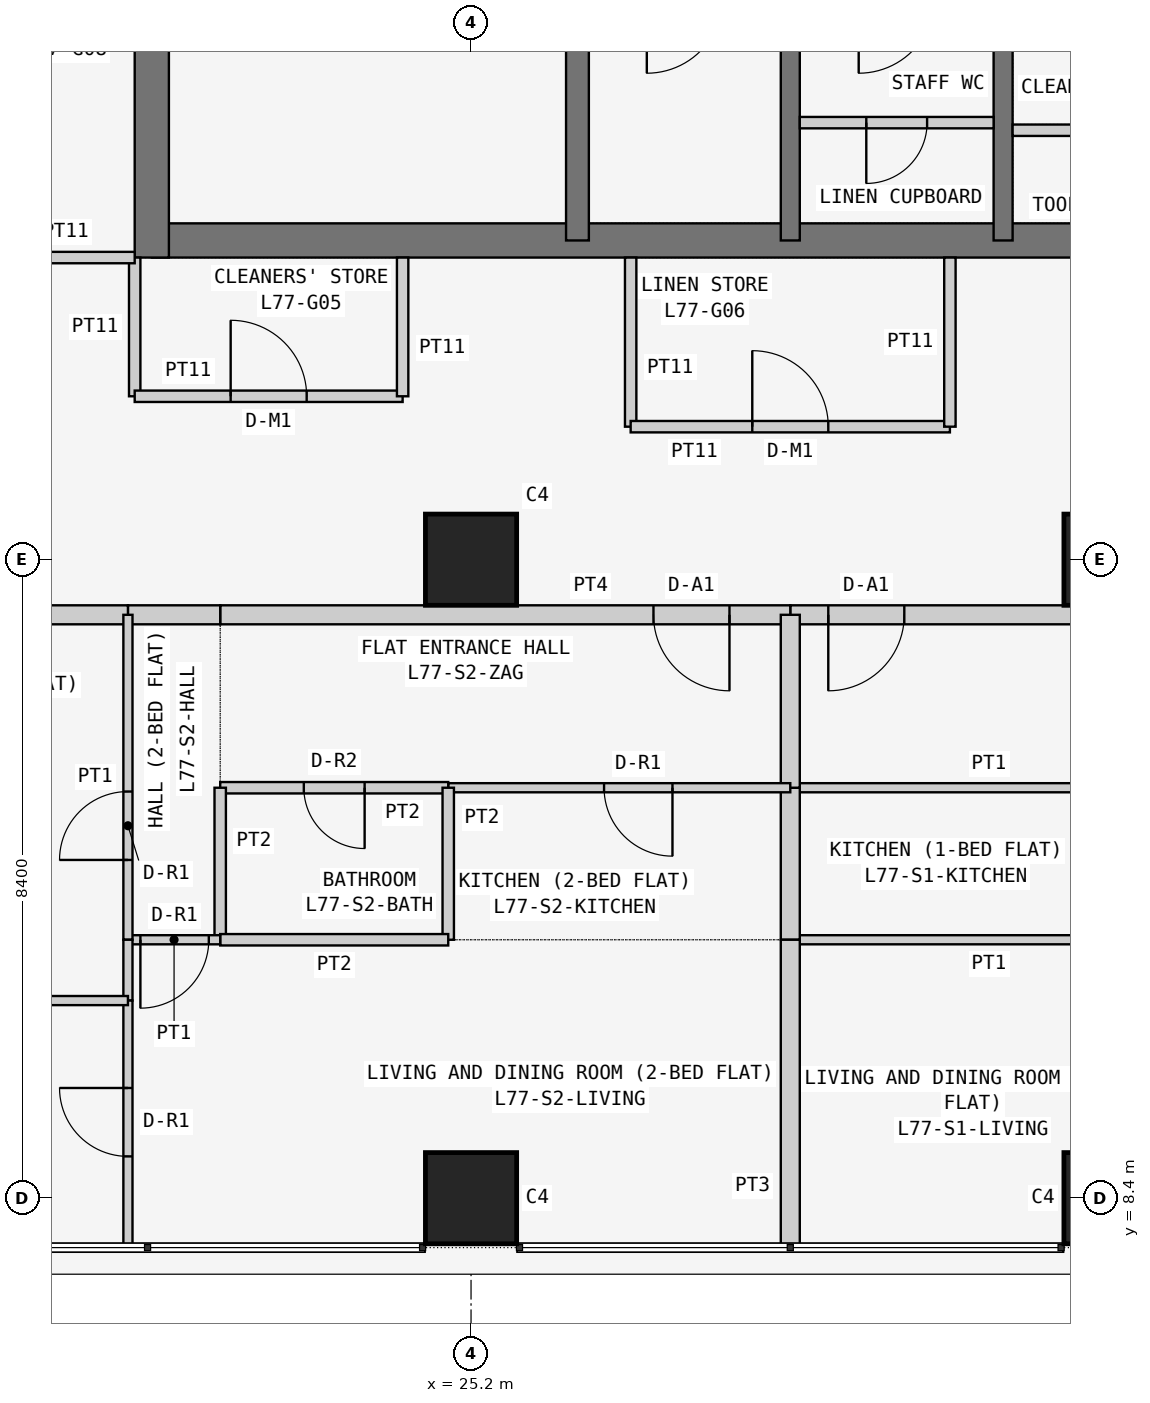
"""IFC4 building model, lengths in metres.
Left out: names, types, materials, properties, quantities, classifications, styles, units other than length and angle.
Written with IfcOpenShell. Run it as: python <this file> out.ifc"""

import sys

from ifc_helpers import new_model, si_unit, direction, frame, frame_2d, origin, origin_2d, place, context, subcontext, project, spatial, rectangle, extrude, element, fill, save


model = new_model("IFC4")
c1 = context("Model", 3, precision=1e-05, world=origin(), true_north=direction((0.0, 1.0)))
c2 = subcontext(c1, "Body", "Model", "MODEL_VIEW")
j1 = project(units=[si_unit("LENGTHUNIT", "METRE"), si_unit("PLANEANGLEUNIT", "RADIAN")], contexts=[c1])
p1 = place(None, origin())
s1 = spatial("IfcSite", under=j1, at=p1, CompositionType="ELEMENT")
p2 = place(p1, origin())
s2 = spatial("IfcBuilding", under=s1, at=p2, CompositionType="ELEMENT")
p3 = place(p2, frame((0.0, 0.0, 293.7)))
s3 = spatial("IfcBuildingStorey", under=s2, at=p3, CompositionType="ELEMENT", Elevation=293.7)
for number, where, z_axis, x_axis in (
    (1, (25.2, 8.4, 0.0), (0.0, 0.0, 1.0), (1.0, 0.0, 0.0)),
    (2, (25.2, 16.8, 0.0), (0.0, 0.0, 1.0), (1.0, 0.0, 0.0)),
    (3, (33.6, 8.4, 0.0), (0.0, 0.0, 1.0), (1.0, 0.0, 0.0)),
    (4, (33.6, 16.8, 0.0), (0.0, 0.0, 1.0), (1.0, 0.0, 0.0)),
):
    element("IfcColumn", number, at=place(p3, frame(where, z_axis=z_axis, x_axis=x_axis)), inside=s3, PredefinedType="COLUMN", context=c2, shape_type="SweptSolid", body=[
        extrude(rectangle(XDim=1.2, YDim=1.2, at=origin_2d()), origin(), (0.0, 0.0, 1.0), 3.6),
    ])
p4 = place(p3, frame((21.0, 21.0, 0.0), z_axis=(0.0, 0.0, 1.0), x_axis=(1.0, 0.0, 0.0)))
e5 = element("IfcWall", 5, at=p4, inside=s3, PredefinedType="SHEAR", context=c2, shape_type="SweptSolid", body=[
    extrude(rectangle(XDim=17.025, YDim=0.45, at=frame_2d((8.512, 0.0))), origin(), (0.0, 0.0, 1.0), 3.6),
])
p5 = place(p3, frame((21.0, 37.8, 0.0), z_axis=(0.0, 0.0, 1.0), x_axis=(0.0, -1.0, 0.0)))
e6 = element("IfcWall", 6, at=p5, inside=s3, PredefinedType="SHEAR", context=c2, shape_type="SweptSolid", body=[
    extrude(rectangle(XDim=17.025, YDim=0.45, at=frame_2d((8.513, 0.0))), origin(), (0.0, 0.0, 1.0), 3.6),
])
p6 = place(p5, frame((5.4, 0.0, 0.0)))
e7 = element("IfcOpeningElement", 7, at=p6, cuts=e6, PredefinedType="OPENING", context=c2, shape_type="SweptSolid", body=[
    extrude(rectangle(XDim=1.2, YDim=2.1, at=frame_2d((0.6, 1.05))), frame((0.0, 0.235, 0.0), z_axis=(0.0, -1.0, 0.0), x_axis=(1.0, 0.0, 0.0)), (0.0, 0.0, 1.0), 0.47),
])
p7 = place(p3, frame((26.6, 21.0, 0.0), z_axis=(0.0, 0.0, 1.0), x_axis=(0.0, 1.0, 0.0)))
e8 = element("IfcWall", 8, at=p7, inside=s3, PredefinedType="SHEAR", context=c2, shape_type="SweptSolid", body=[
    extrude(rectangle(XDim=16.8, YDim=0.3, at=frame_2d((8.4, 0.0))), origin(), (0.0, 0.0, 1.0), 3.6),
])
p8 = place(p7, frame((10.4, 0.0, 0.0)))
e9 = element("IfcOpeningElement", 9, at=p8, cuts=e8, PredefinedType="OPENING", context=c2, shape_type="SweptSolid", body=[
    extrude(rectangle(XDim=1.2, YDim=2.1, at=frame_2d((0.6, 1.05))), frame((0.0, 0.16, 0.0), z_axis=(0.0, -1.0, 0.0), x_axis=(1.0, 0.0, 0.0)), (0.0, 0.0, 1.0), 0.32),
])
for number, where, z_axis, x_axis in (
    (10, (29.4, 21.0, 0.0), (0.0, 0.0, 1.0), (0.0, 1.0, 0.0)),
    (11, (32.2, 21.0, 0.0), (0.0, 0.0, 1.0), (0.0, 1.0, 0.0)),
):
    element("IfcWall", number, at=place(p3, frame(where, z_axis=z_axis, x_axis=x_axis)), inside=s3, PredefinedType="SHEAR", context=c2, shape_type="SweptSolid", body=[
        extrude(rectangle(XDim=3.2, YDim=0.25, at=frame_2d((1.6, 0.0))), origin(), (0.0, 0.0, 1.0), 3.6),
    ])
p9 = place(p3, frame((20.775, 20.775, 0.0), z_axis=(0.0, 0.0, 1.0), x_axis=(0.0, -1.0, 0.0)))
e12 = element("IfcWall", 12, at=p9, inside=s3, PredefinedType="PARTITIONING", context=c2, shape_type="SweptSolid", body=[
    extrude(rectangle(XDim=1.825, YDim=0.15, at=frame_2d((0.913, 0.0))), origin(), (0.0, 0.0, 1.0), 3.45),
])
p10 = place(p3, frame((20.775, 18.95, 0.0), z_axis=(0.0, 0.0, 1.0), x_axis=(1.0, 0.0, 0.0)))
e13 = element("IfcWall", 13, at=p10, inside=s3, PredefinedType="PARTITIONING", context=c2, shape_type="SweptSolid", body=[
    extrude(rectangle(XDim=3.525, YDim=0.15, at=frame_2d((1.763, 0.0))), origin(), (0.0, 0.0, 1.0), 3.45),
])
p11 = place(p10, frame((1.262, 0.0, 0.0)))
e14 = element("IfcOpeningElement", 14, at=p11, cuts=e13, PredefinedType="OPENING", context=c2, shape_type="SweptSolid", body=[
    extrude(rectangle(XDim=1.0, YDim=2.1, at=frame_2d((0.5, 1.05))), frame((0.0, 0.085, 0.0), z_axis=(0.0, -1.0, 0.0), x_axis=(1.0, 0.0, 0.0)), (0.0, 0.0, 1.0), 0.17),
])
p12 = place(p3, frame((24.3, 18.95, 0.0), z_axis=(0.0, 0.0, 1.0), x_axis=(0.0, 1.0, 0.0)))
e15 = element("IfcWall", 15, at=p12, inside=s3, PredefinedType="PARTITIONING", context=c2, shape_type="SweptSolid", body=[
    extrude(rectangle(XDim=1.825, YDim=0.15, at=frame_2d((0.913, 0.0))), origin(), (0.0, 0.0, 1.0), 3.45),
])
p13 = place(p3, frame((27.3, 20.775, 0.0), z_axis=(0.0, 0.0, 1.0), x_axis=(0.0, -1.0, 0.0)))
e16 = element("IfcWall", 16, at=p13, inside=s3, PredefinedType="PARTITIONING", context=c2, shape_type="SweptSolid", body=[
    extrude(rectangle(XDim=2.225, YDim=0.15, at=frame_2d((1.112, 0.0))), origin(), (0.0, 0.0, 1.0), 3.45),
])
p14 = place(p3, frame((27.3, 18.55, 0.0), z_axis=(0.0, 0.0, 1.0), x_axis=(1.0, 0.0, 0.0)))
e17 = element("IfcWall", 17, at=p14, inside=s3, PredefinedType="PARTITIONING", context=c2, shape_type="SweptSolid", body=[
    extrude(rectangle(XDim=4.2, YDim=0.15, at=frame_2d((2.1, 0.0))), origin(), (0.0, 0.0, 1.0), 3.45),
])
p15 = place(p14, frame((1.6, 0.0, 0.0)))
e18 = element("IfcOpeningElement", 18, at=p15, cuts=e17, PredefinedType="OPENING", context=c2, shape_type="SweptSolid", body=[
    extrude(rectangle(XDim=1.0, YDim=2.1, at=frame_2d((0.5, 1.05))), frame((0.0, 0.085, 0.0), z_axis=(0.0, -1.0, 0.0), x_axis=(1.0, 0.0, 0.0)), (0.0, 0.0, 1.0), 0.17),
])
p16 = place(p3, frame((31.5, 18.55, 0.0), z_axis=(0.0, 0.0, 1.0), x_axis=(0.0, 1.0, 0.0)))
e19 = element("IfcWall", 19, at=p16, inside=s3, PredefinedType="PARTITIONING", context=c2, shape_type="SweptSolid", body=[
    extrude(rectangle(XDim=2.225, YDim=0.15, at=frame_2d((1.112, 0.0))), origin(), (0.0, 0.0, 1.0), 3.45),
])
p17 = place(p3, frame((18.95, 20.775, 0.0), z_axis=(0.0, 0.0, 1.0), x_axis=(1.0, 0.0, 0.0)))
e20 = element("IfcWall", 20, at=p17, inside=s3, PredefinedType="PARTITIONING", context=c2, shape_type="SweptSolid", body=[
    extrude(rectangle(XDim=1.825, YDim=0.15, at=frame_2d((0.913, 0.0))), origin(), (0.0, 0.0, 1.0), 3.45),
])
p18 = place(p3, frame((35.829, 16.075, 0.0), z_axis=(0.0, 0.0, 1.0), x_axis=(-1.0, 0.0, 0.0)))
e21 = element("IfcWall", 21, at=p18, inside=s3, PredefinedType="PARTITIONING", context=c2, shape_type="SweptSolid", body=[
    extrude(rectangle(XDim=6.429, YDim=0.25, at=frame_2d((3.215, 0.0))), origin(), (0.0, 0.0, 1.0), 3.45),
])
p19 = place(p18, frame((4.929, 0.0, 0.0)))
e22 = element("IfcOpeningElement", 22, at=p19, cuts=e21, PredefinedType="OPENING", context=c2, shape_type="SweptSolid", body=[
    extrude(rectangle(XDim=1.0, YDim=2.1, at=frame_2d((0.5, 1.05))), frame((0.0, 0.135, 0.0), z_axis=(0.0, -1.0, 0.0), x_axis=(1.0, 0.0, 0.0)), (0.0, 0.0, 1.0), 0.27),
])
p20 = place(p3, frame((29.4, 16.075, 0.0), z_axis=(0.0, 0.0, 1.0), x_axis=(-1.0, 0.0, 0.0)))
e23 = element("IfcWall", 23, at=p20, inside=s3, PredefinedType="PARTITIONING", context=c2, shape_type="SweptSolid", body=[
    extrude(rectangle(XDim=7.5, YDim=0.25, at=frame_2d((3.75, 0.0))), origin(), (0.0, 0.0, 1.0), 3.45),
])
p21 = place(p20, frame((0.8, 0.0, 0.0)))
e24 = element("IfcOpeningElement", 24, at=p21, cuts=e23, PredefinedType="OPENING", context=c2, shape_type="SweptSolid", body=[
    extrude(rectangle(XDim=1.0, YDim=2.1, at=frame_2d((0.5, 1.05))), frame((0.0, 0.135, 0.0), z_axis=(0.0, -1.0, 0.0), x_axis=(1.0, 0.0, 0.0)), (0.0, 0.0, 1.0), 0.27),
])
p22 = place(p3, frame((21.9, 16.075, 0.0), z_axis=(0.0, 0.0, 1.0), x_axis=(-1.0, 0.0, 0.0)))
e25 = element("IfcWall", 25, at=p22, inside=s3, PredefinedType="PARTITIONING", context=c2, shape_type="SweptSolid", body=[
    extrude(rectangle(XDim=1.214, YDim=0.25, at=frame_2d((0.607, 0.0))), origin(), (0.0, 0.0, 1.0), 3.45),
])
p23 = place(p3, frame((20.686, 16.075, 0.0), z_axis=(0.0, 0.0, 1.0), x_axis=(-1.0, 0.0, 0.0)))
e26 = element("IfcWall", 26, at=p23, inside=s3, PredefinedType="PARTITIONING", context=c2, shape_type="SweptSolid", body=[
    extrude(rectangle(XDim=4.586, YDim=0.25, at=frame_2d((2.293, 0.0))), origin(), (0.0, 0.0, 1.0), 3.45),
])
for number, where, z_axis, x_axis in (
    (27, (29.4, 11.8, 0.0), (0.0, 0.0, 1.0), (1.0, 0.0, 0.0)),
    (28, (34.629, 13.8, 0.0), (0.0, 0.0, 1.0), (-1.0, 0.0, 0.0)),
):
    element("IfcWall", number, at=place(p3, frame(where, z_axis=z_axis, x_axis=x_axis)), inside=s3, PredefinedType="PARTITIONING", context=c2, shape_type="SweptSolid", body=[
        extrude(rectangle(XDim=5.229, YDim=0.12, at=frame_2d((2.615, 0.0))), origin(), (0.0, 0.0, 1.0), 3.45),
    ])
p24 = place(p3, frame((29.4, 13.8, 0.0), z_axis=(0.0, 0.0, 1.0), x_axis=(0.0, -1.0, 0.0)))
e29 = element("IfcWall", 29, at=p24, inside=s3, PredefinedType="PARTITIONING", context=c2, shape_type="SweptSolid", body=[
    extrude(rectangle(XDim=2.0, YDim=0.25, at=frame_2d((1.0, 0.0))), origin(), (0.0, 0.0, 1.0), 2.848),
])
p25 = place(p3, frame((29.4, 13.8, 0.0), z_axis=(0.0, 0.0, 1.0), x_axis=(0.0, 1.0, 0.0)))
e30 = element("IfcWall", 30, at=p25, inside=s3, PredefinedType="PARTITIONING", context=c2, shape_type="SweptSolid", body=[
    extrude(rectangle(XDim=2.275, YDim=0.25, at=frame_2d((1.137, 0.0))), origin(), (0.0, 0.0, 1.0), 2.848),
])
p26 = place(p3, frame((29.4, 7.75, 0.0), z_axis=(0.0, 0.0, 1.0), x_axis=(0.0, 1.0, 0.0)))
e31 = element("IfcWall", 31, at=p26, inside=s3, PredefinedType="PARTITIONING", context=c2, shape_type="SweptSolid", body=[
    extrude(rectangle(XDim=4.05, YDim=0.25, at=frame_2d((2.025, 0.0))), origin(), (0.0, 0.0, 1.0), 2.848),
])
p27 = place(p3, frame((29.4, 13.8, 0.0), z_axis=(0.0, 0.0, 1.0), x_axis=(-1.0, 0.0, 0.0)))
e32 = element("IfcWall", 32, at=p27, inside=s3, PredefinedType="PARTITIONING", context=c2, shape_type="SweptSolid", body=[
    extrude(rectangle(XDim=4.5, YDim=0.12, at=frame_2d((2.25, 0.0))), origin(), (0.0, 0.0, 1.0), 3.45),
])
p28 = place(p27, frame((1.55, 0.0, 0.0)))
e33 = element("IfcOpeningElement", 33, at=p28, cuts=e32, PredefinedType="OPENING", context=c2, shape_type="SweptSolid", body=[
    extrude(rectangle(XDim=0.9, YDim=2.1, at=frame_2d((0.45, 1.05))), frame((0.0, 0.07, 0.0), z_axis=(0.0, -1.0, 0.0), x_axis=(1.0, 0.0, 0.0)), (0.0, 0.0, 1.0), 0.14),
])
p29 = place(p3, frame((24.9, 13.8, 0.0), z_axis=(0.0, 0.0, 1.0), x_axis=(-1.0, 0.0, 0.0)))
e34 = element("IfcWall", 34, at=p29, inside=s3, PredefinedType="PARTITIONING", context=c2, shape_type="SweptSolid", body=[
    extrude(rectangle(XDim=3.0, YDim=0.15, at=frame_2d((1.5, 0.0))), origin(), (0.0, 0.0, 1.0), 3.45),
])
p30 = place(p29, frame((1.1, 0.0, 0.0)))
e35 = element("IfcOpeningElement", 35, at=p30, cuts=e34, PredefinedType="OPENING", context=c2, shape_type="SweptSolid", body=[
    extrude(rectangle(XDim=0.8, YDim=2.1, at=frame_2d((0.4, 1.05))), frame((0.0, 0.085, 0.0), z_axis=(0.0, -1.0, 0.0), x_axis=(1.0, 0.0, 0.0)), (0.0, 0.0, 1.0), 0.17),
])
for number, where, z_axis, x_axis in (
    (36, (24.9, 11.8, 0.0), (0.0, 0.0, 1.0), (0.0, 1.0, 0.0)),
    (37, (21.9, 11.8, 0.0), (0.0, 0.0, 1.0), (0.0, 1.0, 0.0)),
):
    element("IfcWall", number, at=place(p3, frame(where, z_axis=z_axis, x_axis=x_axis)), inside=s3, PredefinedType="PARTITIONING", context=c2, shape_type="SweptSolid", body=[
        extrude(rectangle(XDim=2.0, YDim=0.15, at=frame_2d((1.0, 0.0))), origin(), (0.0, 0.0, 1.0), 3.45),
    ])
p31 = place(p3, frame((24.9, 11.8, 0.0), z_axis=(0.0, 0.0, 1.0), x_axis=(-1.0, 0.0, 0.0)))
e38 = element("IfcWall", 38, at=p31, inside=s3, PredefinedType="PARTITIONING", context=c2, shape_type="SweptSolid", body=[
    extrude(rectangle(XDim=3.0, YDim=0.15, at=frame_2d((1.5, 0.0))), origin(), (0.0, 0.0, 1.0), 3.45),
])
p32 = place(p3, frame((21.9, 11.8, 0.0), z_axis=(0.0, 0.0, 1.0), x_axis=(-1.0, 0.0, 0.0)))
e39 = element("IfcWall", 39, at=p32, inside=s3, PredefinedType="PARTITIONING", context=c2, shape_type="SweptSolid", body=[
    extrude(rectangle(XDim=1.214, YDim=0.12, at=frame_2d((0.607, 0.0))), origin(), (0.0, 0.0, 1.0), 3.45),
])
p33 = place(p32, frame((0.15, 0.0, 0.0)))
e40 = element("IfcOpeningElement", 40, at=p33, cuts=e39, PredefinedType="OPENING", context=c2, shape_type="SweptSolid", body=[
    extrude(rectangle(XDim=0.9, YDim=2.1, at=frame_2d((0.45, 1.05))), frame((0.0, 0.07, 0.0), z_axis=(0.0, -1.0, 0.0), x_axis=(1.0, 0.0, 0.0)), (0.0, 0.0, 1.0), 0.14),
])
p34 = place(p3, frame((20.686, 11.8, 0.0), z_axis=(0.0, 0.0, 1.0), x_axis=(0.0, 1.0, 0.0)))
e41 = element("IfcWall", 41, at=p34, inside=s3, PredefinedType="PARTITIONING", context=c2, shape_type="SweptSolid", body=[
    extrude(rectangle(XDim=4.275, YDim=0.12, at=frame_2d((2.137, 0.0))), origin(), (0.0, 0.0, 1.0), 3.45),
])
p35 = place(p34, frame((1.05, 0.0, 0.0)))
e42 = element("IfcOpeningElement", 42, at=p35, cuts=e41, PredefinedType="OPENING", context=c2, shape_type="SweptSolid", body=[
    extrude(rectangle(XDim=0.9, YDim=2.1, at=frame_2d((0.45, 1.05))), frame((0.0, 0.07, 0.0), z_axis=(0.0, -1.0, 0.0), x_axis=(1.0, 0.0, 0.0)), (0.0, 0.0, 1.0), 0.14),
])
p36 = place(p3, frame((20.686, 11.0, 0.0), z_axis=(0.0, 0.0, 1.0), x_axis=(0.0, 1.0, 0.0)))
e43 = element("IfcWall", 43, at=p36, inside=s3, PredefinedType="PARTITIONING", context=c2, shape_type="SweptSolid", body=[
    extrude(rectangle(XDim=0.8, YDim=0.12, at=frame_2d((0.4, 0.0))), origin(), (0.0, 0.0, 1.0), 3.45),
])
p37 = place(p3, frame((20.686, 7.75, 0.0), z_axis=(0.0, 0.0, 1.0), x_axis=(0.0, 1.0, 0.0)))
e44 = element("IfcWall", 44, at=p37, inside=s3, PredefinedType="PARTITIONING", context=c2, shape_type="SweptSolid", body=[
    extrude(rectangle(XDim=3.25, YDim=0.12, at=frame_2d((1.625, 0.0))), origin(), (0.0, 0.0, 1.0), 3.45),
])
p38 = place(p37, frame((1.2, 0.0, 0.0)))
e45 = element("IfcOpeningElement", 45, at=p38, cuts=e44, PredefinedType="OPENING", context=c2, shape_type="SweptSolid", body=[
    extrude(rectangle(XDim=0.9, YDim=2.1, at=frame_2d((0.45, 1.05))), frame((0.0, 0.07, 0.0), z_axis=(0.0, -1.0, 0.0), x_axis=(1.0, 0.0, 0.0)), (0.0, 0.0, 1.0), 0.14),
])
p39 = place(p3, frame((20.686, 11.0, 0.0), z_axis=(0.0, 0.0, 1.0), x_axis=(-1.0, 0.0, 0.0)))
e46 = element("IfcWall", 46, at=p39, inside=s3, PredefinedType="PARTITIONING", context=c2, shape_type="SweptSolid", body=[
    extrude(rectangle(XDim=4.586, YDim=0.12, at=frame_2d((2.293, 0.0))), origin(), (0.0, 0.0, 1.0), 3.45),
])
p40 = place(p3, frame((29.525, 22.55, 0.0), z_axis=(0.0, 0.0, 1.0), x_axis=(1.0, 0.0, 0.0)))
e47 = element("IfcWall", 47, at=p40, inside=s3, PredefinedType="PARTITIONING", context=c2, shape_type="SweptSolid", body=[
    extrude(rectangle(XDim=2.55, YDim=0.15, at=frame_2d((1.275, 0.0))), origin(), (0.0, 0.0, 1.0), 3.45),
])
p41 = place(p40, frame((0.875, 0.0, 0.0)))
e48 = element("IfcOpeningElement", 48, at=p41, cuts=e47, PredefinedType="OPENING", context=c2, shape_type="SweptSolid", body=[
    extrude(rectangle(XDim=0.8, YDim=2.1, at=frame_2d((0.4, 1.05))), frame((0.0, 0.085, 0.0), z_axis=(0.0, -1.0, 0.0), x_axis=(1.0, 0.0, 0.0)), (0.0, 0.0, 1.0), 0.17),
])
p42 = place(p3, frame((32.325, 22.45, 0.0), z_axis=(0.0, 0.0, 1.0), x_axis=(1.0, 0.0, 0.0)))
e49 = element("IfcWall", 49, at=p42, inside=s3, PredefinedType="PARTITIONING", context=c2, shape_type="SweptSolid", body=[
    extrude(rectangle(XDim=2.55, YDim=0.15, at=frame_2d((1.275, 0.0))), origin(), (0.0, 0.0, 1.0), 3.45),
])
p43 = place(p42, frame((0.875, 0.0, 0.0)))
e50 = element("IfcOpeningElement", 50, at=p43, cuts=e49, PredefinedType="OPENING", context=c2, shape_type="SweptSolid", body=[
    extrude(rectangle(XDim=0.8, YDim=2.1, at=frame_2d((0.4, 1.05))), frame((0.0, 0.085, 0.0), z_axis=(0.0, -1.0, 0.0), x_axis=(1.0, 0.0, 0.0)), (0.0, 0.0, 1.0), 0.17),
])
p44 = place(p11, origin())
e51 = element("IfcDoor", 51, at=p44, inside=s3, OperationType="SINGLE_SWING_LEFT", PredefinedType="DOOR", context=c2, shape_type="SweptSolid", body=[
    extrude(rectangle(XDim=1.0, YDim=2.1, at=frame_2d((0.5, 1.05))), frame((0.0, 0.025, 0.0), z_axis=(0.0, -1.0, 0.0), x_axis=(1.0, 0.0, 0.0)), (0.0, 0.0, 1.0), 0.05),
])
fill(e14, e51)
p45 = place(p15, origin())
e52 = element("IfcDoor", 52, at=p45, inside=s3, OperationType="SINGLE_SWING_LEFT", PredefinedType="DOOR", context=c2, shape_type="SweptSolid", body=[
    extrude(rectangle(XDim=1.0, YDim=2.1, at=frame_2d((0.5, 1.05))), frame((0.0, 0.025, 0.0), z_axis=(0.0, -1.0, 0.0), x_axis=(1.0, 0.0, 0.0)), (0.0, 0.0, 1.0), 0.05),
])
fill(e18, e52)
p46 = place(p19, origin())
e53 = element("IfcDoor", 53, at=p46, inside=s3, OperationType="SINGLE_SWING_RIGHT", PredefinedType="DOOR", context=c2, shape_type="SweptSolid", body=[
    extrude(rectangle(XDim=1.0, YDim=2.1, at=frame_2d((0.5, 1.05))), frame((0.0, 0.025, 0.0), z_axis=(0.0, -1.0, 0.0), x_axis=(1.0, 0.0, 0.0)), (0.0, 0.0, 1.0), 0.05),
])
fill(e22, e53)
p47 = place(p21, origin())
e54 = element("IfcDoor", 54, at=p47, inside=s3, OperationType="SINGLE_SWING_LEFT", PredefinedType="DOOR", context=c2, shape_type="SweptSolid", body=[
    extrude(rectangle(XDim=1.0, YDim=2.1, at=frame_2d((0.5, 1.05))), frame((0.0, 0.025, 0.0), z_axis=(0.0, -1.0, 0.0), x_axis=(1.0, 0.0, 0.0)), (0.0, 0.0, 1.0), 0.05),
])
fill(e24, e54)
p48 = place(p28, origin())
e55 = element("IfcDoor", 55, at=p48, inside=s3, OperationType="SINGLE_SWING_LEFT", PredefinedType="DOOR", context=c2, shape_type="SweptSolid", body=[
    extrude(rectangle(XDim=0.9, YDim=2.1, at=frame_2d((0.45, 1.05))), frame((0.0, 0.025, 0.0), z_axis=(0.0, -1.0, 0.0), x_axis=(1.0, 0.0, 0.0)), (0.0, 0.0, 1.0), 0.05),
])
fill(e33, e55)
p49 = place(p30, origin())
e56 = element("IfcDoor", 56, at=p49, inside=s3, OperationType="SINGLE_SWING_LEFT", PredefinedType="DOOR", context=c2, shape_type="SweptSolid", body=[
    extrude(rectangle(XDim=0.8, YDim=2.1, at=frame_2d((0.4, 1.05))), frame((0.0, 0.025, 0.0), z_axis=(0.0, -1.0, 0.0), x_axis=(1.0, 0.0, 0.0)), (0.0, 0.0, 1.0), 0.05),
])
fill(e35, e56)
p50 = place(p33, origin())
e57 = element("IfcDoor", 57, at=p50, inside=s3, OperationType="SINGLE_SWING_RIGHT", PredefinedType="DOOR", context=c2, shape_type="SweptSolid", body=[
    extrude(rectangle(XDim=0.9, YDim=2.1, at=frame_2d((0.45, 1.05))), frame((0.0, 0.025, 0.0), z_axis=(0.0, -1.0, 0.0), x_axis=(1.0, 0.0, 0.0)), (0.0, 0.0, 1.0), 0.05),
])
fill(e40, e57)
p51 = place(p35, origin())
e58 = element("IfcDoor", 58, at=p51, inside=s3, OperationType="SINGLE_SWING_LEFT", PredefinedType="DOOR", context=c2, shape_type="SweptSolid", body=[
    extrude(rectangle(XDim=0.9, YDim=2.1, at=frame_2d((0.45, 1.05))), frame((0.0, 0.025, 0.0), z_axis=(0.0, -1.0, 0.0), x_axis=(1.0, 0.0, 0.0)), (0.0, 0.0, 1.0), 0.05),
])
fill(e42, e58)
p52 = place(p38, origin())
e59 = element("IfcDoor", 59, at=p52, inside=s3, OperationType="SINGLE_SWING_RIGHT", PredefinedType="DOOR", context=c2, shape_type="SweptSolid", body=[
    extrude(rectangle(XDim=0.9, YDim=2.1, at=frame_2d((0.45, 1.05))), frame((0.0, 0.025, 0.0), z_axis=(0.0, -1.0, 0.0), x_axis=(1.0, 0.0, 0.0)), (0.0, 0.0, 1.0), 0.05),
])
fill(e45, e59)
p53 = place(p41, frame((0.8, 0.0, 0.0), z_axis=(0.0, 0.0, 1.0), x_axis=(-1.0, 0.0, 0.0)))
e60 = element("IfcDoor", 60, at=p53, inside=s3, OperationType="SINGLE_SWING_RIGHT", PredefinedType="DOOR", context=c2, shape_type="SweptSolid", body=[
    extrude(rectangle(XDim=0.8, YDim=2.1, at=frame_2d((0.4, 1.05))), frame((0.0, 0.025, 0.0), z_axis=(0.0, -1.0, 0.0), x_axis=(1.0, 0.0, 0.0)), (0.0, 0.0, 1.0), 0.05),
])
fill(e48, e60)
save(model, sys.argv[1])
